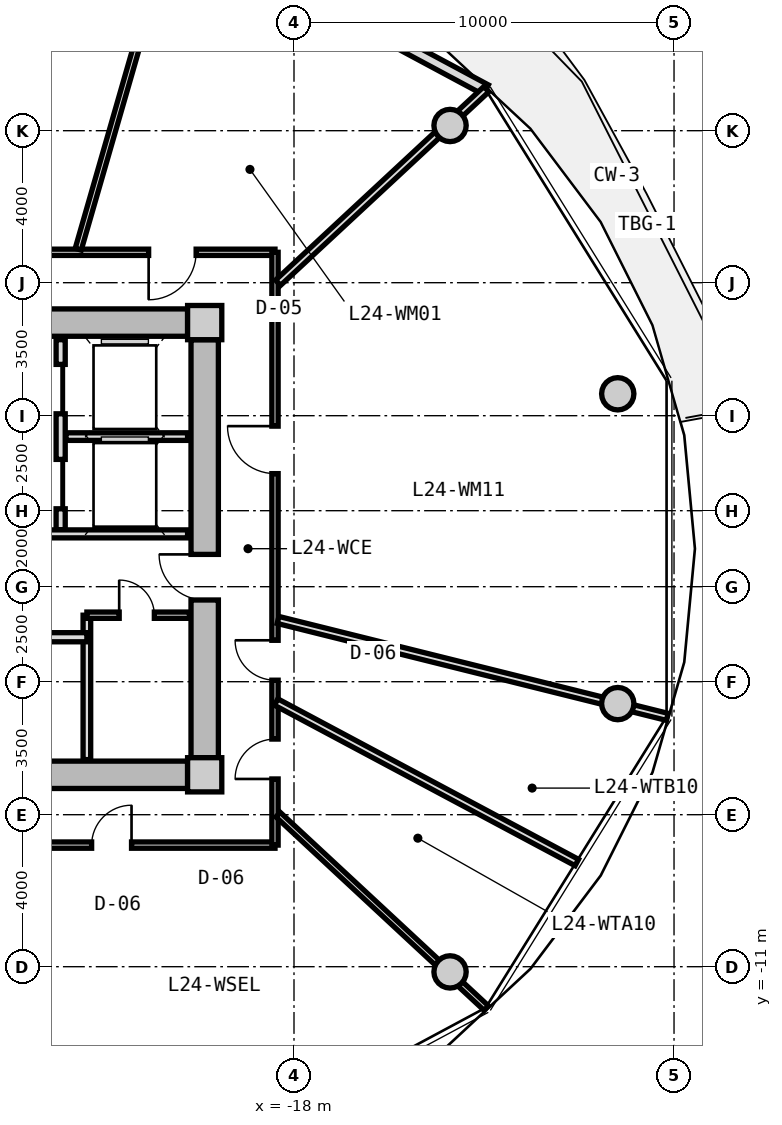
"""IFC4 building model, lengths in metres.
Left out: names, types, materials, properties, quantities, classifications, styles, units other than length and angle.
Written with IfcOpenShell. Run it as: python <this file> out.ifc"""

import sys

from ifc_helpers import new_model, si_unit, direction, frame, frame_2d, origin, origin_2d, place, context, subcontext, project, spatial, rectangle, circle, extrude, source, transform, mapped, element, fill, save


model = new_model("IFC4")
c1 = context("Model", 3, precision=1e-05, world=origin(), true_north=direction((0.0, 1.0)))
c2 = subcontext(c1, "Body", "Model", "MODEL_VIEW")
j1 = project(units=[si_unit("LENGTHUNIT", "METRE"), si_unit("PLANEANGLEUNIT", "RADIAN")], contexts=[c1])
p1 = place(None, origin())
s1 = spatial("IfcSite", under=j1, at=p1, CompositionType="ELEMENT")
p2 = place(p1, origin())
s2 = spatial("IfcBuilding", under=s1, at=p2, CompositionType="ELEMENT")
p3 = place(p2, frame((0.0, 0.0, 81.0)))
s3 = spatial("IfcBuildingStorey", under=s2, at=p3, CompositionType="ELEMENT", Elevation=81.0)
m1 = source(origin(), c2, "Body", "SweptSolid", [
    extrude(rectangle(XDim=0.9, YDim=0.9, at=origin_2d()), origin(), (0.0, 0.0, 1.0), 3.05),
])
for number, where, z_axis, x_axis in (
    (1, (-20.35, -5.95, 0.0), (0.0, 0.0, 1.0), (1.0, 0.0, 0.0)),
    (2, (-20.35, 5.95, 0.0), (0.0, 0.0, 1.0), (1.0, 0.0, 0.0)),
):
    element("IfcColumn", number, at=place(p3, frame(where, z_axis=z_axis, x_axis=x_axis)), inside=s3, PredefinedType="COLUMN", context=c2, shape_type="MappedRepresentation", body=[
        mapped(m1, transform((0.0, 0.0, 0.0), x_axis=(1.0, 0.0, 0.0), y_axis=(0.0, 1.0, 0.0), z_axis=(0.0, 0.0, 1.0), scale=1.0)),
    ])
m2 = source(origin(), c2, "Body", "SweptSolid", [
    extrude(rectangle(XDim=14.4, YDim=0.72, at=frame_2d((7.2, 0.0))), origin(), (0.0, 0.0, 1.0), 2.79),
])
for number, where, z_axis, x_axis in (
    (3, (-35.2, 5.95, 0.0), (0.0, 0.0, 1.0), (1.0, 0.0, 0.0)),
    (4, (-20.8, -5.95, 0.0), (0.0, 0.0, 1.0), (-1.0, 0.0, 0.0)),
):
    element("IfcWall", number, at=place(p3, frame(where, z_axis=z_axis, x_axis=x_axis)), inside=s3, PredefinedType="SHEAR", context=c2, shape_type="MappedRepresentation", body=[
        mapped(m2, transform((0.0, 0.0, 0.0), x_axis=(1.0, 0.0, 0.0), y_axis=(0.0, 1.0, 0.0), z_axis=(0.0, 0.0, 1.0), scale=1.0)),
    ])
m3 = source(origin(), c2, "Body", "SweptSolid", [
    extrude(rectangle(XDim=11.0, YDim=0.72, at=frame_2d((5.5, 0.0))), origin(), (0.0, 0.0, 1.0), 2.79),
])
p4 = place(p3, frame((-20.35, 5.5, 0.0), z_axis=(0.0, 0.0, 1.0), x_axis=(0.0, -1.0, 0.0)))
e5 = element("IfcWall", 5, at=p4, inside=s3, PredefinedType="SHEAR", context=c2, shape_type="MappedRepresentation", body=[
    mapped(m3, transform((0.0, 0.0, 0.0), x_axis=(1.0, 0.0, 0.0), y_axis=(0.0, 1.0, 0.0), z_axis=(0.0, 0.0, 1.0), scale=1.0)),
])
p5 = place(p4, frame((5.65, 0.0, 0.0)))
e6 = element("IfcOpeningElement", 6, at=p5, cuts=e5, PredefinedType="OPENING", context=c2, shape_type="SweptSolid", body=[
    extrude(rectangle(XDim=1.2, YDim=2.15, at=frame_2d((0.6, 1.075))), frame((0.0, 0.37, 0.0), z_axis=(0.0, -1.0, 0.0), x_axis=(1.0, 0.0, 0.0)), (0.0, 0.0, 1.0), 0.74),
])
m4 = source(origin(), c2, "Body", "SweptSolid", [
    extrude(circle(Radius=0.425, at=origin_2d()), origin(), (0.0, 0.0, 1.0), 3.05),
])
for number, where, z_axis, x_axis in (
    (7, (-9.481, 4.076, 0.0), (0.0, 0.0, 1.0), (1.0, 0.0, 0.0)),
    (8, (-13.894, 11.137, 0.0), (0.0, 0.0, 1.0), (1.0, 0.0, 0.0)),
    (9, (-13.894, -11.137, 0.0), (0.0, 0.0, 1.0), (1.0, 0.0, 0.0)),
    (10, (-9.481, -4.076, 0.0), (0.0, 0.0, 1.0), (1.0, 0.0, 0.0)),
):
    element("IfcColumn", number, at=place(p3, frame(where, z_axis=z_axis, x_axis=x_axis)), inside=s3, PredefinedType="COLUMN", context=c2, shape_type="MappedRepresentation", body=[
        mapped(m4, transform((0.0, 0.0, 0.0), x_axis=(1.0, 0.0, 0.0), y_axis=(0.0, 1.0, 0.0), z_axis=(0.0, 0.0, 1.0), scale=1.0)),
    ])
m5 = source(origin(), c2, "Body", "SweptSolid", [
    extrude(rectangle(XDim=9.351, YDim=0.29, at=frame_2d((4.675, 0.0))), origin(), (0.0, 0.0, 1.0), 2.79),
])
p6 = place(p3, frame((-21.193, 16.498, 0.0), z_axis=(0.0, 0.0, 1.0), x_axis=(0.881184411073, -0.472772708267, 0.0)))
e11 = element("IfcWall", 11, at=p6, inside=s3, PredefinedType="SOLIDWALL", context=c2, shape_type="MappedRepresentation", body=[
    mapped(m5, transform((0.0, 0.0, 0.0), x_axis=(1.0, 0.0, 0.0), y_axis=(0.0, 1.0, 0.0), z_axis=(0.0, 0.0, 1.0), scale=1.0)),
])
p7 = place(p6, frame((0.9, 0.0, 0.0)))
e12 = element("IfcOpeningElement", 12, at=p7, cuts=e11, PredefinedType="OPENING", context=c2, shape_type="SweptSolid", body=[
    extrude(rectangle(XDim=1.15, YDim=2.25, at=frame_2d((0.575, 1.125))), frame((0.0, 0.155, 0.0), z_axis=(0.0, -1.0, 0.0), x_axis=(1.0, 0.0, 0.0)), (0.0, 0.0, 1.0), 0.31),
])
p8 = place(p6, frame((5.025, 0.0, 0.85)))
e13 = element("IfcOpeningElement", 13, at=p8, cuts=e11, PredefinedType="OPENING", context=c2, shape_type="SweptSolid", body=[
    extrude(rectangle(XDim=1.2, YDim=1.5, at=frame_2d((0.6, 0.75))), frame((0.0, 0.155, 0.0), z_axis=(0.0, -1.0, 0.0), x_axis=(1.0, 0.0, 0.0)), (0.0, 0.0, 1.0), 0.31),
])
m6 = source(origin(), c2, "Body", "SweptSolid", [
    extrude(rectangle(XDim=5.0, YDim=0.24, at=frame_2d((2.5, 0.0))), origin(), (0.0, 0.0, 1.0), 2.775),
])
p9 = place(p3, frame((-24.14, 0.5, 0.0), z_axis=(0.0, 0.0, 1.0), x_axis=(0.0, 1.0, 0.0)))
e14 = element("IfcWall", 14, at=p9, inside=s3, PredefinedType="PARTITIONING", context=c2, shape_type="MappedRepresentation", body=[
    mapped(m6, transform((0.0, 0.0, 0.0), x_axis=(1.0, 0.0, 0.0), y_axis=(0.0, 1.0, 0.0), z_axis=(0.0, 0.0, 1.0), scale=1.0)),
])
p10 = place(p9, frame((3.05, 0.0, 0.0)))
e15 = element("IfcOpeningElement", 15, at=p10, cuts=e14, PredefinedType="OPENING", context=c2, shape_type="SweptSolid", body=[
    extrude(rectangle(XDim=1.3, YDim=2.2, at=frame_2d((0.65, 1.1))), frame((0.0, 0.13, 0.0), z_axis=(0.0, -1.0, 0.0), x_axis=(1.0, 0.0, 0.0)), (0.0, 0.0, 1.0), 0.26),
])
p11 = place(p9, frame((0.55, 0.0, 0.0)))
e16 = element("IfcOpeningElement", 16, at=p11, cuts=e14, PredefinedType="OPENING", context=c2, shape_type="SweptSolid", body=[
    extrude(rectangle(XDim=1.3, YDim=2.2, at=frame_2d((0.65, 1.1))), frame((0.0, 0.13, 0.0), z_axis=(0.0, -1.0, 0.0), x_axis=(1.0, 0.0, 0.0)), (0.0, 0.0, 1.0), 0.26),
])
m7 = source(origin(), c2, "Body", "SweptSolid", [
    extrude(rectangle(XDim=3.2, YDim=0.2, at=frame_2d((1.6, 0.0))), origin(), (0.0, 0.0, 1.0), 2.775),
])
p12 = place(p3, frame((-24.0, 2.95, 0.0), z_axis=(0.0, 0.0, 1.0), x_axis=(1.0, 0.0, 0.0)))
e17 = element("IfcWall", 17, at=p12, inside=s3, PredefinedType="PARTITIONING", context=c2, shape_type="MappedRepresentation", body=[
    mapped(m7, transform((0.0, 0.0, 0.0), x_axis=(1.0, 0.0, 0.0), y_axis=(0.0, 1.0, 0.0), z_axis=(0.0, 0.0, 1.0), scale=1.0)),
])
m8 = source(origin(), c2, "Body", "SweptSolid", [
    extrude(rectangle(XDim=6.66, YDim=0.21, at=frame_2d((3.33, 0.0))), origin(), (0.0, 0.0, 1.0), 2.775),
])
p13 = place(p3, frame((-27.46, 0.39, 0.0), z_axis=(0.0, 0.0, 1.0), x_axis=(1.0, 0.0, 0.0)))
e18 = element("IfcWall", 18, at=p13, inside=s3, PredefinedType="PARTITIONING", context=c2, shape_type="MappedRepresentation", body=[
    mapped(m8, transform((0.0, 0.0, 0.0), x_axis=(1.0, 0.0, 0.0), y_axis=(0.0, 1.0, 0.0), z_axis=(0.0, 0.0, 1.0), scale=1.0)),
])
p14 = place(p13, frame((1.0, 0.0, 0.0)))
e19 = element("IfcOpeningElement", 19, at=p14, cuts=e18, PredefinedType="OPENING", context=c2, shape_type="SweptSolid", body=[
    extrude(rectangle(XDim=1.2, YDim=2.15, at=frame_2d((0.6, 1.075))), frame((0.0, 0.115, 0.0), z_axis=(0.0, -1.0, 0.0), x_axis=(1.0, 0.0, 0.0)), (0.0, 0.0, 1.0), 0.23),
])
m9 = source(origin(), c2, "Body", "SweptSolid", [
    extrude(rectangle(XDim=3.8, YDim=0.2, at=frame_2d((1.9, 0.0))), origin(), (0.0, 0.0, 1.0), 2.775),
])
p15 = place(p3, frame((-23.45, -5.55, 0.0), z_axis=(0.0, 0.0, 1.0), x_axis=(0.0, 1.0, 0.0)))
e20 = element("IfcWall", 20, at=p15, inside=s3, PredefinedType="PARTITIONING", context=c2, shape_type="MappedRepresentation", body=[
    mapped(m9, transform((0.0, 0.0, 0.0), x_axis=(1.0, 0.0, 0.0), y_axis=(0.0, 1.0, 0.0), z_axis=(0.0, 0.0, 1.0), scale=1.0)),
])
m10 = source(origin(), c2, "Body", "SweptSolid", [
    extrude(rectangle(XDim=4.13, YDim=0.24, at=frame_2d((2.065, 0.0))), origin(), (0.0, 0.0, 1.0), 2.775),
])
p16 = place(p3, frame((-27.58, -2.33, 0.0), z_axis=(0.0, 0.0, 1.0), x_axis=(1.0, 0.0, 0.0)))
e21 = element("IfcWall", 21, at=p16, inside=s3, PredefinedType="PARTITIONING", context=c2, shape_type="MappedRepresentation", body=[
    mapped(m10, transform((0.0, 0.0, 0.0), x_axis=(1.0, 0.0, 0.0), y_axis=(0.0, 1.0, 0.0), z_axis=(0.0, 0.0, 1.0), scale=1.0)),
])
p17 = place(p16, frame((0.5, 0.0, 0.0)))
e22 = element("IfcOpeningElement", 22, at=p17, cuts=e21, PredefinedType="OPENING", context=c2, shape_type="SweptSolid", body=[
    extrude(rectangle(XDim=1.1, YDim=2.2, at=frame_2d((0.55, 1.1))), frame((0.0, 0.13, 0.0), z_axis=(0.0, -1.0, 0.0), x_axis=(1.0, 0.0, 0.0)), (0.0, 0.0, 1.0), 0.26),
])
m11 = source(origin(), c2, "Body", "SweptSolid", [
    extrude(rectangle(XDim=2.7, YDim=0.165, at=frame_2d((1.35, 0.0))), origin(), (0.0, 0.0, 1.0), 2.775),
])
p18 = place(p3, frame((-23.45, -1.75, 0.0), z_axis=(0.0, 0.0, 1.0), x_axis=(1.0, 0.0, 0.0)))
e23 = element("IfcWall", 23, at=p18, inside=s3, PredefinedType="PARTITIONING", context=c2, shape_type="MappedRepresentation", body=[
    mapped(m11, transform((0.0, 0.0, 0.0), x_axis=(1.0, 0.0, 0.0), y_axis=(0.0, 1.0, 0.0), z_axis=(0.0, 0.0, 1.0), scale=1.0)),
])
p19 = place(p18, frame((0.85, 0.0, 0.0)))
e24 = element("IfcOpeningElement", 24, at=p19, cuts=e23, PredefinedType="OPENING", context=c2, shape_type="SweptSolid", body=[
    extrude(rectangle(XDim=0.925, YDim=2.1, at=frame_2d((0.462, 1.05))), frame((0.0, 0.093, 0.0), z_axis=(0.0, -1.0, 0.0), x_axis=(1.0, 0.0, 0.0)), (0.0, 0.0, 1.0), 0.185),
])
m12 = source(origin(), c2, "Body", "SweptSolid", [
    extrude(rectangle(XDim=8.6, YDim=0.165, at=frame_2d((4.3, 0.0))), origin(), (0.0, 0.0, 1.0), 2.775),
])
p20 = place(p3, frame((-27.1, 7.8, 0.0), z_axis=(0.0, 0.0, 1.0), x_axis=(1.0, 0.0, 0.0)))
e25 = element("IfcWall", 25, at=p20, inside=s3, PredefinedType="PARTITIONING", context=c2, shape_type="MappedRepresentation", body=[
    mapped(m12, transform((0.0, 0.0, 0.0), x_axis=(1.0, 0.0, 0.0), y_axis=(0.0, 1.0, 0.0), z_axis=(0.0, 0.0, 1.0), scale=1.0)),
])
p21 = place(p20, frame((5.275, 0.0, 0.0)))
e26 = element("IfcOpeningElement", 26, at=p21, cuts=e25, PredefinedType="OPENING", context=c2, shape_type="SweptSolid", body=[
    extrude(rectangle(XDim=1.25, YDim=2.2, at=frame_2d((0.625, 1.1))), frame((0.0, 0.093, 0.0), z_axis=(0.0, -1.0, 0.0), x_axis=(1.0, 0.0, 0.0)), (0.0, 0.0, 1.0), 0.185),
])
p22 = place(p3, frame((-18.5, -7.8, 0.0), z_axis=(0.0, 0.0, 1.0), x_axis=(-1.0, 0.0, 0.0)))
e27 = element("IfcWall", 27, at=p22, inside=s3, PredefinedType="PARTITIONING", context=c2, shape_type="MappedRepresentation", body=[
    mapped(m12, transform((0.0, 0.0, 0.0), x_axis=(1.0, 0.0, 0.0), y_axis=(0.0, 1.0, 0.0), z_axis=(0.0, 0.0, 1.0), scale=1.0)),
])
p23 = place(p22, frame((3.775, 0.0, 0.0)))
e28 = element("IfcOpeningElement", 28, at=p23, cuts=e27, PredefinedType="OPENING", context=c2, shape_type="SweptSolid", body=[
    extrude(rectangle(XDim=1.05, YDim=2.15, at=frame_2d((0.525, 1.075))), frame((0.0, 0.093, 0.0), z_axis=(0.0, -1.0, 0.0), x_axis=(1.0, 0.0, 0.0)), (0.0, 0.0, 1.0), 0.185),
])
m13 = source(origin(), c2, "Body", "SweptSolid", [
    extrude(rectangle(XDim=15.6, YDim=0.165, at=frame_2d((7.8, 0.0))), origin(), (0.0, 0.0, 1.0), 2.775),
])
p24 = place(p3, frame((-18.5, 7.8, 0.0), z_axis=(0.0, 0.0, 1.0), x_axis=(0.0, -1.0, 0.0)))
e29 = element("IfcWall", 29, at=p24, inside=s3, PredefinedType="PARTITIONING", context=c2, shape_type="MappedRepresentation", body=[
    mapped(m13, transform((0.0, 0.0, 0.0), x_axis=(1.0, 0.0, 0.0), y_axis=(0.0, 1.0, 0.0), z_axis=(0.0, 0.0, 1.0), scale=1.0)),
])
p25 = place(p24, frame((12.81, 0.0, 0.0)))
e30 = element("IfcOpeningElement", 30, at=p25, cuts=e29, PredefinedType="OPENING", context=c2, shape_type="SweptSolid", body=[
    extrude(rectangle(XDim=1.05, YDim=2.15, at=frame_2d((0.525, 1.075))), frame((0.0, 0.093, 0.0), z_axis=(0.0, -1.0, 0.0), x_axis=(1.0, 0.0, 0.0)), (0.0, 0.0, 1.0), 0.185),
])
p26 = place(p24, frame((10.21, 0.0, 0.0)))
e31 = element("IfcOpeningElement", 31, at=p26, cuts=e29, PredefinedType="OPENING", context=c2, shape_type="SweptSolid", body=[
    extrude(rectangle(XDim=1.05, YDim=2.15, at=frame_2d((0.525, 1.075))), frame((0.0, 0.093, 0.0), z_axis=(0.0, -1.0, 0.0), x_axis=(1.0, 0.0, 0.0)), (0.0, 0.0, 1.0), 0.185),
])
p27 = place(p24, frame((4.575, 0.0, 0.0)))
e32 = element("IfcOpeningElement", 32, at=p27, cuts=e29, PredefinedType="OPENING", context=c2, shape_type="SweptSolid", body=[
    extrude(rectangle(XDim=1.25, YDim=2.2, at=frame_2d((0.625, 1.1))), frame((0.0, 0.093, 0.0), z_axis=(0.0, -1.0, 0.0), x_axis=(1.0, 0.0, 0.0)), (0.0, 0.0, 1.0), 0.185),
])
m14 = source(origin(), c2, "Body", "SweptSolid", [
    extrude(rectangle(XDim=8.989, YDim=0.165, at=frame_2d((4.495, 0.0))), origin(), (0.0, 0.0, 1.0), 2.415),
])
p28 = place(p3, frame((-23.678, 7.88, 0.0), z_axis=(0.0, 0.0, 1.0), x_axis=(0.27702323008, 0.960863221274, 0.0)))
e33 = element("IfcWall", 33, at=p28, inside=s3, PredefinedType="PARTITIONING", context=c2, shape_type="MappedRepresentation", body=[
    mapped(m14, transform((0.0, 0.0, 0.0), x_axis=(1.0, 0.0, 0.0), y_axis=(0.0, 1.0, 0.0), z_axis=(0.0, 0.0, 1.0), scale=1.0)),
])
m15 = source(origin(), c2, "Body", "SweptSolid", [
    extrude(rectangle(XDim=7.482, YDim=0.165, at=frame_2d((3.741, 0.0))), origin(), (0.0, 0.0, 1.0), 2.275),
])
p29 = place(p3, frame((-18.42, -6.998, 0.0), z_axis=(0.0, 0.0, 1.0), x_axis=(0.732508698043, -0.680757671489, 0.0)))
e34 = element("IfcWall", 34, at=p29, inside=s3, PredefinedType="PARTITIONING", context=c2, shape_type="MappedRepresentation", body=[
    mapped(m15, transform((0.0, 0.0, 0.0), x_axis=(1.0, 0.0, 0.0), y_axis=(0.0, 1.0, 0.0), z_axis=(0.0, 0.0, 1.0), scale=1.0)),
])
m16 = source(origin(), c2, "Body", "SweptSolid", [
    extrude(rectangle(XDim=10.556, YDim=0.19, at=frame_2d((5.278, 0.0))), origin(), (0.0, 0.0, 1.0), 2.275),
])
p30 = place(p3, frame((-18.42, -1.875, 0.0), z_axis=(0.0, 0.0, 1.0), x_axis=(0.970363857851, -0.241648470667, 0.0)))
e35 = element("IfcWall", 35, at=p30, inside=s3, PredefinedType="PARTITIONING", context=c2, shape_type="MappedRepresentation", body=[
    mapped(m16, transform((0.0, 0.0, 0.0), x_axis=(1.0, 0.0, 0.0), y_axis=(0.0, 1.0, 0.0), z_axis=(0.0, 0.0, 1.0), scale=1.0)),
])
m17 = source(origin(), c2, "Body", "SweptSolid", [
    extrude(rectangle(XDim=8.968, YDim=0.19, at=frame_2d((4.484, 0.0))), origin(), (0.0, 0.0, 1.0), 2.775),
])
p31 = place(p3, frame((-18.47, -4.036, 0.0), z_axis=(0.0, 0.0, 1.0), x_axis=(0.882202936563, -0.47086938605, 0.0)))
e36 = element("IfcWall", 36, at=p31, inside=s3, PredefinedType="PARTITIONING", context=c2, shape_type="MappedRepresentation", body=[
    mapped(m17, transform((0.0, 0.0, 0.0), x_axis=(1.0, 0.0, 0.0), y_axis=(0.0, 1.0, 0.0), z_axis=(0.0, 0.0, 1.0), scale=1.0)),
])
m18 = source(origin(), c2, "Body", "SweptSolid", [
    extrude(rectangle(XDim=7.482, YDim=0.19, at=frame_2d((3.741, 0.0))), origin(), (0.0, 0.0, 1.0), 2.275),
])
p32 = place(p3, frame((-18.42, 6.998, 0.0), z_axis=(0.0, 0.0, 1.0), x_axis=(0.732508698043, 0.680757671489, 0.0)))
e37 = element("IfcWall", 37, at=p32, inside=s3, PredefinedType="PARTITIONING", context=c2, shape_type="MappedRepresentation", body=[
    mapped(m18, transform((0.0, 0.0, 0.0), x_axis=(1.0, 0.0, 0.0), y_axis=(0.0, 1.0, 0.0), z_axis=(0.0, 0.0, 1.0), scale=1.0)),
])
m19 = source(origin(), c2, "Body", "SweptSolid", [
    extrude(rectangle(XDim=1.3, YDim=2.2, at=frame_2d((0.65, 1.1))), frame((0.0, 0.025, 0.0), z_axis=(0.0, -1.0, 0.0), x_axis=(1.0, 0.0, 0.0)), (0.0, 0.0, 1.0), 0.05),
])
p33 = place(p10, origin())
e38 = element("IfcDoor", 38, at=p33, inside=s3, OperationType="SLIDING_TO_LEFT", PredefinedType="DOOR", context=c2, shape_type="MappedRepresentation", body=[
    mapped(m19, transform((0.0, 0.0, 0.0), x_axis=(1.0, 0.0, 0.0), y_axis=(0.0, 1.0, 0.0), z_axis=(0.0, 0.0, 1.0), scale=1.0)),
])
fill(e15, e38)
p34 = place(p11, origin())
e39 = element("IfcDoor", 39, at=p34, inside=s3, OperationType="SLIDING_TO_RIGHT", PredefinedType="DOOR", context=c2, shape_type="MappedRepresentation", body=[
    mapped(m19, transform((0.0, 0.0, 0.0), x_axis=(1.0, 0.0, 0.0), y_axis=(0.0, 1.0, 0.0), z_axis=(0.0, 0.0, 1.0), scale=1.0)),
])
fill(e16, e39)
m20 = source(origin(), c2, "Body", "SweptSolid", [
    extrude(rectangle(XDim=1.2, YDim=2.15, at=frame_2d((0.6, 1.075))), frame((0.0, 0.025, 0.0), z_axis=(0.0, -1.0, 0.0), x_axis=(1.0, 0.0, 0.0)), (0.0, 0.0, 1.0), 0.05),
])
p35 = place(p5, frame((1.2, 0.0, 0.0), z_axis=(0.0, 0.0, 1.0), x_axis=(-1.0, 0.0, 0.0)))
e40 = element("IfcDoor", 40, at=p35, inside=s3, OperationType="SINGLE_SWING_RIGHT", PredefinedType="DOOR", context=c2, shape_type="MappedRepresentation", body=[
    mapped(m20, transform((0.0, 0.0, 0.0), x_axis=(1.0, 0.0, 0.0), y_axis=(0.0, 1.0, 0.0), z_axis=(0.0, 0.0, 1.0), scale=1.0)),
])
fill(e6, e40)
m21 = source(origin(), c2, "Body", "SweptSolid", [
    extrude(rectangle(XDim=0.925, YDim=2.1, at=frame_2d((0.462, 1.05))), frame((0.0, 0.025, 0.0), z_axis=(0.0, -1.0, 0.0), x_axis=(1.0, 0.0, 0.0)), (0.0, 0.0, 1.0), 0.05),
])
p36 = place(p19, origin())
e41 = element("IfcDoor", 41, at=p36, inside=s3, OperationType="SINGLE_SWING_LEFT", PredefinedType="DOOR", context=c2, shape_type="MappedRepresentation", body=[
    mapped(m21, transform((0.0, 0.0, 0.0), x_axis=(1.0, 0.0, 0.0), y_axis=(0.0, 1.0, 0.0), z_axis=(0.0, 0.0, 1.0), scale=1.0)),
])
fill(e24, e41)
m22 = source(origin(), c2, "Body", "SweptSolid", [
    extrude(rectangle(XDim=1.05, YDim=2.15, at=frame_2d((0.525, 1.075))), frame((0.0, 0.025, 0.0), z_axis=(0.0, -1.0, 0.0), x_axis=(1.0, 0.0, 0.0)), (0.0, 0.0, 1.0), 0.05),
])
p37 = place(p23, frame((1.05, 0.0, 0.0), z_axis=(0.0, 0.0, 1.0), x_axis=(-1.0, 0.0, 0.0)))
e42 = element("IfcDoor", 42, at=p37, inside=s3, OperationType="SINGLE_SWING_RIGHT", PredefinedType="DOOR", context=c2, shape_type="MappedRepresentation", body=[
    mapped(m22, transform((0.0, 0.0, 0.0), x_axis=(1.0, 0.0, 0.0), y_axis=(0.0, 1.0, 0.0), z_axis=(0.0, 0.0, 1.0), scale=1.0)),
])
fill(e28, e42)
p38 = place(p25, frame((1.05, 0.0, 0.0), z_axis=(0.0, 0.0, 1.0), x_axis=(-1.0, 0.0, 0.0)))
e43 = element("IfcDoor", 43, at=p38, inside=s3, OperationType="SINGLE_SWING_LEFT", PredefinedType="DOOR", context=c2, shape_type="MappedRepresentation", body=[
    mapped(m22, transform((0.0, 0.0, 0.0), x_axis=(1.0, 0.0, 0.0), y_axis=(0.0, 1.0, 0.0), z_axis=(0.0, 0.0, 1.0), scale=1.0)),
])
fill(e30, e43)
p39 = place(p26, frame((1.05, 0.0, 0.0), z_axis=(0.0, 0.0, 1.0), x_axis=(-1.0, 0.0, 0.0)))
e44 = element("IfcDoor", 44, at=p39, inside=s3, OperationType="SINGLE_SWING_RIGHT", PredefinedType="DOOR", context=c2, shape_type="MappedRepresentation", body=[
    mapped(m22, transform((0.0, 0.0, 0.0), x_axis=(1.0, 0.0, 0.0), y_axis=(0.0, 1.0, 0.0), z_axis=(0.0, 0.0, 1.0), scale=1.0)),
])
fill(e31, e44)
m23 = source(origin(), c2, "Body", "SweptSolid", [
    extrude(rectangle(XDim=1.25, YDim=2.2, at=frame_2d((0.625, 1.1))), frame((0.0, 0.025, 0.0), z_axis=(0.0, -1.0, 0.0), x_axis=(1.0, 0.0, 0.0)), (0.0, 0.0, 1.0), 0.05),
])
p40 = place(p27, frame((1.25, 0.0, 0.0), z_axis=(0.0, 0.0, 1.0), x_axis=(-1.0, 0.0, 0.0)))
e45 = element("IfcDoor", 45, at=p40, inside=s3, OperationType="SINGLE_SWING_RIGHT", PredefinedType="DOOR", context=c2, shape_type="MappedRepresentation", body=[
    mapped(m23, transform((0.0, 0.0, 0.0), x_axis=(1.0, 0.0, 0.0), y_axis=(0.0, 1.0, 0.0), z_axis=(0.0, 0.0, 1.0), scale=1.0)),
])
fill(e32, e45)
p41 = place(p21, frame((1.25, 0.0, 0.0), z_axis=(0.0, 0.0, 1.0), x_axis=(-1.0, 0.0, 0.0)))
e46 = element("IfcDoor", 46, at=p41, inside=s3, OperationType="SINGLE_SWING_RIGHT", PredefinedType="DOOR", context=c2, shape_type="MappedRepresentation", body=[
    mapped(m23, transform((0.0, 0.0, 0.0), x_axis=(1.0, 0.0, 0.0), y_axis=(0.0, 1.0, 0.0), z_axis=(0.0, 0.0, 1.0), scale=1.0)),
])
fill(e26, e46)
save(model, sys.argv[1])
